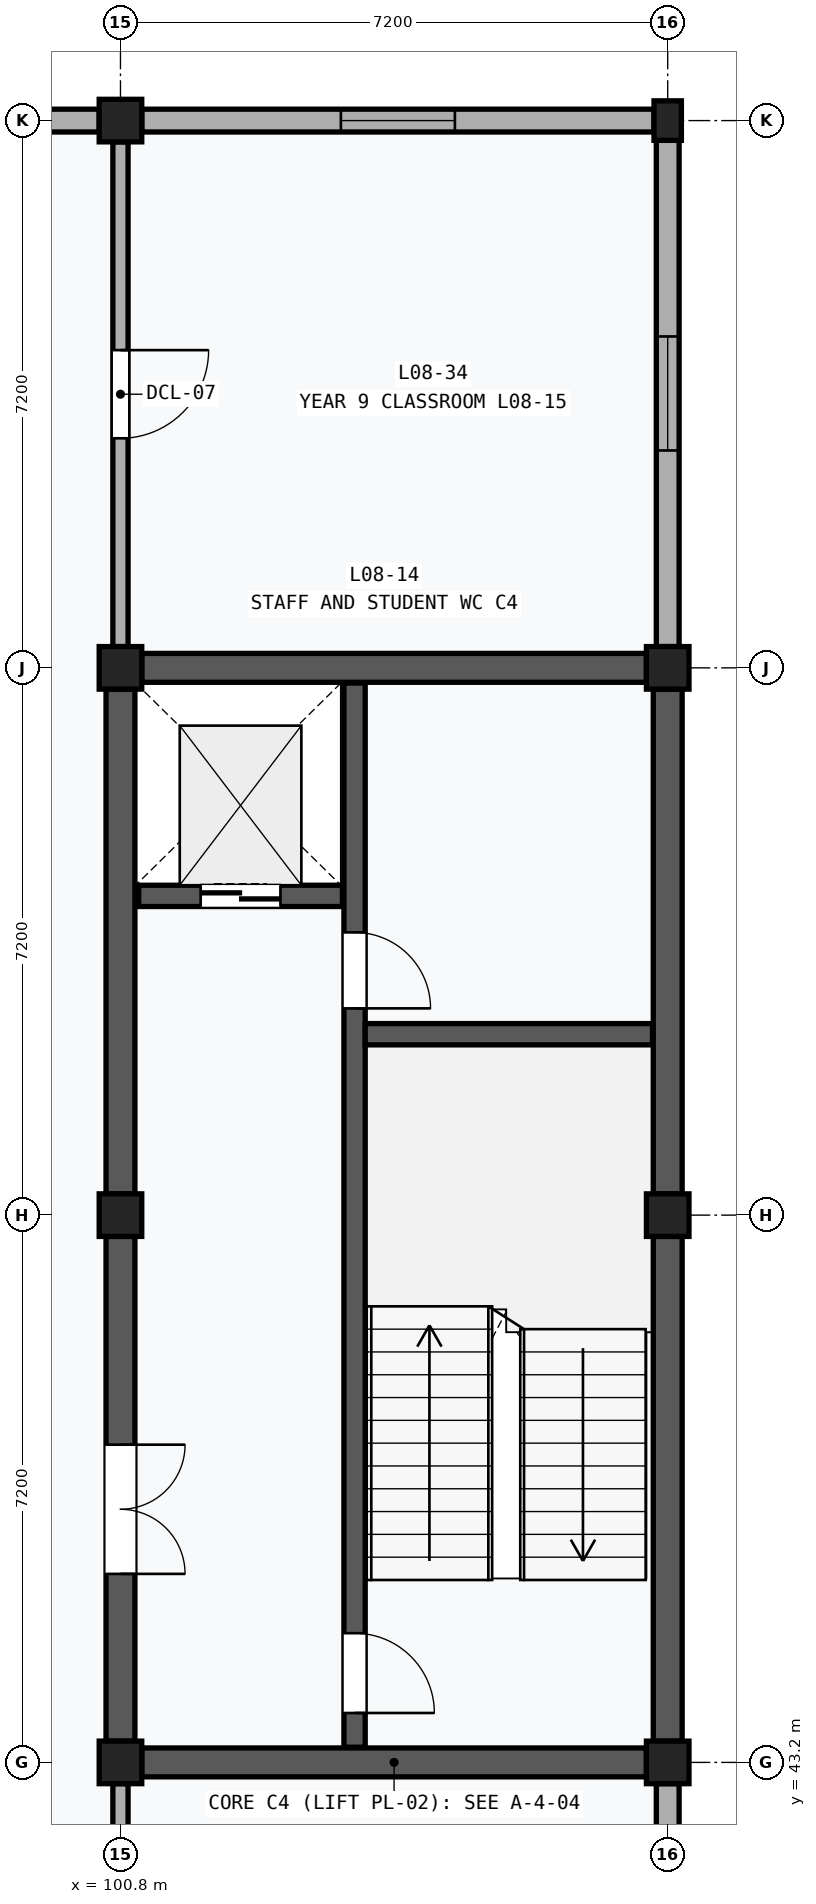
"""IFC4 building model, lengths in metres.
Left out: names, types, materials, properties, quantities, classifications, styles, units other than length and angle.
Written with IfcOpenShell. Run it as: python <this file> out.ifc"""

import sys

from ifc_helpers import new_model, si_unit, direction, frame, frame_2d, origin, origin_2d, place, context, subcontext, project, spatial, rectangle, extrude, element, fill, save


model = new_model("IFC4")
c1 = context("Model", 3, precision=1e-05, world=origin(), true_north=direction((0.0, 1.0)))
c2 = subcontext(c1, "Body", "Model", "MODEL_VIEW")
j1 = project(units=[si_unit("LENGTHUNIT", "METRE"), si_unit("PLANEANGLEUNIT", "RADIAN")], contexts=[c1])
p1 = place(None, origin())
s1 = spatial("IfcSite", under=j1, at=p1, CompositionType="ELEMENT")
p2 = place(p1, origin())
s2 = spatial("IfcBuilding", under=s1, at=p2, CompositionType="ELEMENT")
p3 = place(p2, frame((0.0, 0.0, 34.8)))
s3 = spatial("IfcBuildingStorey", under=s2, at=p3, CompositionType="ELEMENT", Elevation=34.8)
for number, where, z_axis, x_axis in (
    (1, (100.8, 43.2, 0.0), (0.0, 0.0, 1.0), (1.0, 0.0, 0.0)),
    (2, (100.8, 50.4, 0.0), (0.0, 0.0, 1.0), (1.0, 0.0, 0.0)),
    (3, (100.8, 57.6, 0.0), (0.0, 0.0, 1.0), (1.0, 0.0, 0.0)),
    (4, (100.8, 64.8, 0.0), (0.0, 0.0, 1.0), (1.0, 0.0, 0.0)),
    (5, (108.0, 43.2, 0.0), (0.0, 0.0, 1.0), (1.0, 0.0, 0.0)),
    (6, (108.0, 50.4, 0.0), (0.0, 0.0, 1.0), (1.0, 0.0, 0.0)),
    (7, (108.0, 57.6, 0.0), (0.0, 0.0, 1.0), (1.0, 0.0, 0.0)),
):
    element("IfcColumn", number, at=place(p3, frame(where, z_axis=z_axis, x_axis=x_axis)), inside=s3, PredefinedType="COLUMN", context=c2, shape_type="SweptSolid", body=[
        extrude(rectangle(XDim=0.56, YDim=0.56, at=origin_2d()), origin(), (0.0, 0.0, 1.0), 4.0),
    ])
p4 = place(p3, frame((108.0, 64.8, 0.0), z_axis=(0.0, 0.0, 1.0), x_axis=(1.0, 0.0, 0.0)))
e8 = element("IfcColumn", 8, at=p4, inside=s3, PredefinedType="PILASTER", context=c2, shape_type="SweptSolid", body=[
    extrude(rectangle(XDim=0.36, YDim=0.52, at=origin_2d()), origin(), (0.0, 0.0, 1.0), 4.0),
])
p5 = place(p3, frame((93.88, 64.8, 0.0), z_axis=(0.0, 0.0, 1.0), x_axis=(1.0, 0.0, 0.0)))
e9 = element("IfcWall", 9, at=p5, inside=s3, PredefinedType="SOLIDWALL", context=c2, shape_type="SweptSolid", body=[
    extrude(rectangle(XDim=6.64, YDim=0.3, at=frame_2d((3.32, 0.0))), origin(), (0.0, 0.0, 1.0), 3.19),
])
p6 = place(p5, frame((2.57, 0.0, 1.1)))
e10 = element("IfcOpeningElement", 10, at=p6, cuts=e9, PredefinedType="OPENING", context=c2, shape_type="SweptSolid", body=[
    extrude(rectangle(XDim=1.5, YDim=1.35, at=frame_2d((0.75, 0.675))), frame((0.0, 0.162, 0.0), z_axis=(0.0, -1.0, 0.0), x_axis=(1.0, 0.0, 0.0)), (0.0, 0.0, 1.0), 0.324),
])
p7 = place(p3, frame((108.0, 36.26, 0.0), z_axis=(0.0, 0.0, 1.0), x_axis=(0.0, 1.0, 0.0)))
e11 = element("IfcWall", 11, at=p7, inside=s3, PredefinedType="SOLIDWALL", context=c2, shape_type="SweptSolid", body=[
    extrude(rectangle(XDim=6.66, YDim=0.3, at=frame_2d((3.33, 0.0))), origin(), (0.0, 0.0, 1.0), 3.19),
])
p8 = place(p3, frame((101.08, 64.8, 0.0), z_axis=(0.0, 0.0, 1.0), x_axis=(1.0, 0.0, 0.0)))
e12 = element("IfcWall", 12, at=p8, inside=s3, PredefinedType="SOLIDWALL", context=c2, shape_type="SweptSolid", body=[
    extrude(rectangle(XDim=6.74, YDim=0.3, at=frame_2d((3.37, 0.0))), origin(), (0.0, 0.0, 1.0), 3.19),
])
p9 = place(p8, frame((2.62, 0.0, 1.1)))
e13 = element("IfcOpeningElement", 13, at=p9, cuts=e12, PredefinedType="OPENING", context=c2, shape_type="SweptSolid", body=[
    extrude(rectangle(XDim=1.5, YDim=1.35, at=frame_2d((0.75, 0.675))), frame((0.0, 0.162, 0.0), z_axis=(0.0, -1.0, 0.0), x_axis=(1.0, 0.0, 0.0)), (0.0, 0.0, 1.0), 0.324),
])
p10 = place(p3, frame((108.0, 57.88, 0.0), z_axis=(0.0, 0.0, 1.0), x_axis=(0.0, 1.0, 0.0)))
e14 = element("IfcWall", 14, at=p10, inside=s3, PredefinedType="SOLIDWALL", context=c2, shape_type="SweptSolid", body=[
    extrude(rectangle(XDim=6.66, YDim=0.3, at=frame_2d((3.33, 0.0))), origin(), (0.0, 0.0, 1.0), 3.19),
])
p11 = place(p10, frame((2.58, 0.0, 1.1)))
e15 = element("IfcOpeningElement", 15, at=p11, cuts=e14, PredefinedType="OPENING", context=c2, shape_type="SweptSolid", body=[
    extrude(rectangle(XDim=1.5, YDim=1.35, at=frame_2d((0.75, 0.675))), frame((0.0, 0.162, 0.0), z_axis=(0.0, -1.0, 0.0), x_axis=(1.0, 0.0, 0.0)), (0.0, 0.0, 1.0), 0.324),
])
p12 = place(p3, frame((100.8, 43.48, 0.0), z_axis=(0.0, 0.0, 1.0), x_axis=(0.0, 1.0, 0.0)))
e16 = element("IfcWall", 16, at=p12, inside=s3, PredefinedType="SHEAR", context=c2, shape_type="SweptSolid", body=[
    extrude(rectangle(XDim=6.64, YDim=0.38, at=frame_2d((3.32, 0.0))), origin(), (0.0, 0.0, 1.0), 3.03),
])
p13 = place(p12, frame((2.2, 0.0, 0.0)))
e17 = element("IfcOpeningElement", 17, at=p13, cuts=e16, PredefinedType="OPENING", context=c2, shape_type="SweptSolid", body=[
    extrude(rectangle(XDim=1.7, YDim=2.25, at=frame_2d((0.85, 1.125))), frame((0.0, 0.202, 0.0), z_axis=(0.0, -1.0, 0.0), x_axis=(1.0, 0.0, 0.0)), (0.0, 0.0, 1.0), 0.404),
])
p14 = place(p3, frame((100.8, 50.68, 0.0), z_axis=(0.0, 0.0, 1.0), x_axis=(0.0, 1.0, 0.0)))
e18 = element("IfcWall", 18, at=p14, inside=s3, PredefinedType="SHEAR", context=c2, shape_type="SweptSolid", body=[
    extrude(rectangle(XDim=6.64, YDim=0.38, at=frame_2d((3.32, 0.0))), origin(), (0.0, 0.0, 1.0), 3.03),
])
for number, where, z_axis, x_axis in (
    (19, (108.0, 43.48, 0.0), (0.0, 0.0, 1.0), (0.0, 1.0, 0.0)),
    (20, (108.0, 50.68, 0.0), (0.0, 0.0, 1.0), (0.0, 1.0, 0.0)),
):
    element("IfcWall", number, at=place(p3, frame(where, z_axis=z_axis, x_axis=x_axis)), inside=s3, PredefinedType="SHEAR", context=c2, shape_type="SweptSolid", body=[
        extrude(rectangle(XDim=6.64, YDim=0.38, at=frame_2d((3.32, 0.0))), origin(), (0.0, 0.0, 1.0), 3.19),
    ])
for number, where, z_axis, x_axis in (
    (21, (101.08, 43.2, 0.0), (0.0, 0.0, 1.0), (1.0, 0.0, 0.0)),
    (22, (101.08, 57.6, 0.0), (0.0, 0.0, 1.0), (1.0, 0.0, 0.0)),
):
    element("IfcWall", number, at=place(p3, frame(where, z_axis=z_axis, x_axis=x_axis)), inside=s3, PredefinedType="SHEAR", context=c2, shape_type="SweptSolid", body=[
        extrude(rectangle(XDim=6.64, YDim=0.38, at=frame_2d((3.32, 0.0))), origin(), (0.0, 0.0, 1.0), 3.03),
    ])
p15 = place(p3, frame((103.88, 43.4, 0.0), z_axis=(0.0, 0.0, 1.0), x_axis=(0.0, 1.0, 0.0)))
e23 = element("IfcWall", 23, at=p15, inside=s3, PredefinedType="SHEAR", context=c2, shape_type="SweptSolid", body=[
    extrude(rectangle(XDim=14.0, YDim=0.28, at=frame_2d((7.0, 0.0))), origin(), (0.0, 0.0, 1.0), 3.76),
])
p16 = place(p15, frame((0.45, 0.0, 0.0)))
e24 = element("IfcOpeningElement", 24, at=p16, cuts=e23, PredefinedType="OPENING", context=c2, shape_type="SweptSolid", body=[
    extrude(rectangle(XDim=1.05, YDim=2.15, at=frame_2d((0.525, 1.075))), frame((0.0, 0.152, 0.0), z_axis=(0.0, -1.0, 0.0), x_axis=(1.0, 0.0, 0.0)), (0.0, 0.0, 1.0), 0.304),
])
p17 = place(p15, frame((9.72, 0.0, 0.0)))
e25 = element("IfcOpeningElement", 25, at=p17, cuts=e23, PredefinedType="OPENING", context=c2, shape_type="SweptSolid", body=[
    extrude(rectangle(XDim=1.0, YDim=2.15, at=frame_2d((0.5, 1.075))), frame((0.0, 0.152, 0.0), z_axis=(0.0, -1.0, 0.0), x_axis=(1.0, 0.0, 0.0)), (0.0, 0.0, 1.0), 0.304),
])
p18 = place(p3, frame((104.02, 52.78, 0.0), z_axis=(0.0, 0.0, 1.0), x_axis=(1.0, 0.0, 0.0)))
e26 = element("IfcWall", 26, at=p18, inside=s3, PredefinedType="SHEAR", context=c2, shape_type="SweptSolid", body=[
    extrude(rectangle(XDim=3.78, YDim=0.28, at=frame_2d((1.89, 0.0))), origin(), (0.0, 0.0, 1.0), 3.76),
])
p19 = place(p3, frame((101.04, 54.6, 0.0), z_axis=(0.0, 0.0, 1.0), x_axis=(1.0, 0.0, 0.0)))
e27 = element("IfcWall", 27, at=p19, inside=s3, PredefinedType="SHEAR", context=c2, shape_type="SweptSolid", body=[
    extrude(rectangle(XDim=2.68, YDim=0.28, at=frame_2d((1.34, 0.0))), origin(), (0.0, 0.0, 1.0), 3.76),
])
p20 = place(p19, frame((0.815, 0.0, 0.0)))
e28 = element("IfcOpeningElement", 28, at=p20, cuts=e27, PredefinedType="OPENING", context=c2, shape_type="SweptSolid", body=[
    extrude(rectangle(XDim=1.05, YDim=2.2, at=frame_2d((0.525, 1.1))), frame((0.0, 0.152, 0.0), z_axis=(0.0, -1.0, 0.0), x_axis=(1.0, 0.0, 0.0)), (0.0, 0.0, 1.0), 0.304),
])
p21 = place(p3, frame((100.8, 36.28, 0.0), z_axis=(0.0, 0.0, 1.0), x_axis=(0.0, 1.0, 0.0)))
e29 = element("IfcWall", 29, at=p21, inside=s3, PredefinedType="PARTITIONING", context=c2, shape_type="SweptSolid", body=[
    extrude(rectangle(XDim=6.64, YDim=0.2, at=frame_2d((3.32, 0.0))), origin(), (0.0, 0.0, 1.0), 3.03),
])
p22 = place(p3, frame((100.8, 57.88, 0.0), z_axis=(0.0, 0.0, 1.0), x_axis=(0.0, 1.0, 0.0)))
e30 = element("IfcWall", 30, at=p22, inside=s3, PredefinedType="PARTITIONING", context=c2, shape_type="SweptSolid", body=[
    extrude(rectangle(XDim=6.64, YDim=0.2, at=frame_2d((3.32, 0.0))), origin(), (0.0, 0.0, 1.0), 3.03),
])
p23 = place(p22, frame((2.74, 0.0, 0.0)))
e31 = element("IfcOpeningElement", 31, at=p23, cuts=e30, PredefinedType="OPENING", context=c2, shape_type="SweptSolid", body=[
    extrude(rectangle(XDim=1.16, YDim=2.22, at=frame_2d((0.58, 1.11))), frame((0.0, 0.112, 0.0), z_axis=(0.0, -1.0, 0.0), x_axis=(1.0, 0.0, 0.0)), (0.0, 0.0, 1.0), 0.224),
])
p24 = place(p9, origin())
e32 = element("IfcWindow", 32, at=p24, inside=s3, PartitioningType="SINGLE_PANEL", PredefinedType="WINDOW", context=c2, shape_type="SweptSolid", body=[
    extrude(rectangle(XDim=1.5, YDim=1.35, at=frame_2d((0.75, 0.675))), frame((0.0, 0.03, 0.0), z_axis=(0.0, -1.0, 0.0), x_axis=(1.0, 0.0, 0.0)), (0.0, 0.0, 1.0), 0.06),
])
fill(e13, e32)
p25 = place(p11, origin())
e33 = element("IfcWindow", 33, at=p25, inside=s3, PartitioningType="SINGLE_PANEL", PredefinedType="WINDOW", context=c2, shape_type="SweptSolid", body=[
    extrude(rectangle(XDim=1.5, YDim=1.35, at=frame_2d((0.75, 0.675))), frame((0.0, 0.03, 0.0), z_axis=(0.0, -1.0, 0.0), x_axis=(1.0, 0.0, 0.0)), (0.0, 0.0, 1.0), 0.06),
])
fill(e15, e33)
p26 = place(p13, frame((1.7, 0.0, 0.0), z_axis=(0.0, 0.0, 1.0), x_axis=(-1.0, 0.0, 0.0)))
e34 = element("IfcDoor", 34, at=p26, inside=s3, OperationType="DOUBLE_DOOR_SINGLE_SWING", PredefinedType="DOOR", context=c2, shape_type="SweptSolid", body=[
    extrude(rectangle(XDim=1.7, YDim=2.25, at=frame_2d((0.85, 1.125))), frame((0.0, 0.025, 0.0), z_axis=(0.0, -1.0, 0.0), x_axis=(1.0, 0.0, 0.0)), (0.0, 0.0, 1.0), 0.05),
])
fill(e17, e34)
p27 = place(p16, frame((1.05, 0.0, 0.0), z_axis=(0.0, 0.0, 1.0), x_axis=(-1.0, 0.0, 0.0)))
e35 = element("IfcDoor", 35, at=p27, inside=s3, OperationType="SINGLE_SWING_RIGHT", PredefinedType="DOOR", context=c2, shape_type="SweptSolid", body=[
    extrude(rectangle(XDim=1.05, YDim=2.15, at=frame_2d((0.525, 1.075))), frame((0.0, 0.025, 0.0), z_axis=(0.0, -1.0, 0.0), x_axis=(1.0, 0.0, 0.0)), (0.0, 0.0, 1.0), 0.05),
])
fill(e24, e35)
p28 = place(p17, frame((1.0, 0.0, 0.0), z_axis=(0.0, 0.0, 1.0), x_axis=(-1.0, 0.0, 0.0)))
e36 = element("IfcDoor", 36, at=p28, inside=s3, OperationType="SINGLE_SWING_RIGHT", PredefinedType="DOOR", context=c2, shape_type="SweptSolid", body=[
    extrude(rectangle(XDim=1.0, YDim=2.15, at=frame_2d((0.5, 1.075))), frame((0.0, 0.025, 0.0), z_axis=(0.0, -1.0, 0.0), x_axis=(1.0, 0.0, 0.0)), (0.0, 0.0, 1.0), 0.05),
])
fill(e25, e36)
p29 = place(p20, frame((1.05, 0.0, 0.0), z_axis=(0.0, 0.0, 1.0), x_axis=(-1.0, 0.0, 0.0)))
e37 = element("IfcDoor", 37, at=p29, inside=s3, OperationType="DOUBLE_DOOR_SLIDING", PredefinedType="DOOR", context=c2, shape_type="SweptSolid", body=[
    extrude(rectangle(XDim=1.05, YDim=2.2, at=frame_2d((0.525, 1.1))), frame((0.0, 0.025, 0.0), z_axis=(0.0, -1.0, 0.0), x_axis=(1.0, 0.0, 0.0)), (0.0, 0.0, 1.0), 0.05),
])
fill(e28, e37)
p30 = place(p23, frame((1.16, 0.0, 0.0), z_axis=(0.0, 0.0, 1.0), x_axis=(-1.0, 0.0, 0.0)))
e38 = element("IfcDoor", 38, at=p30, inside=s3, OperationType="SINGLE_SWING_LEFT", PredefinedType="DOOR", context=c2, shape_type="SweptSolid", body=[
    extrude(rectangle(XDim=1.16, YDim=2.22, at=frame_2d((0.58, 1.11))), frame((0.0, 0.025, 0.0), z_axis=(0.0, -1.0, 0.0), x_axis=(1.0, 0.0, 0.0)), (0.0, 0.0, 1.0), 0.05),
])
fill(e31, e38)
save(model, sys.argv[1])
